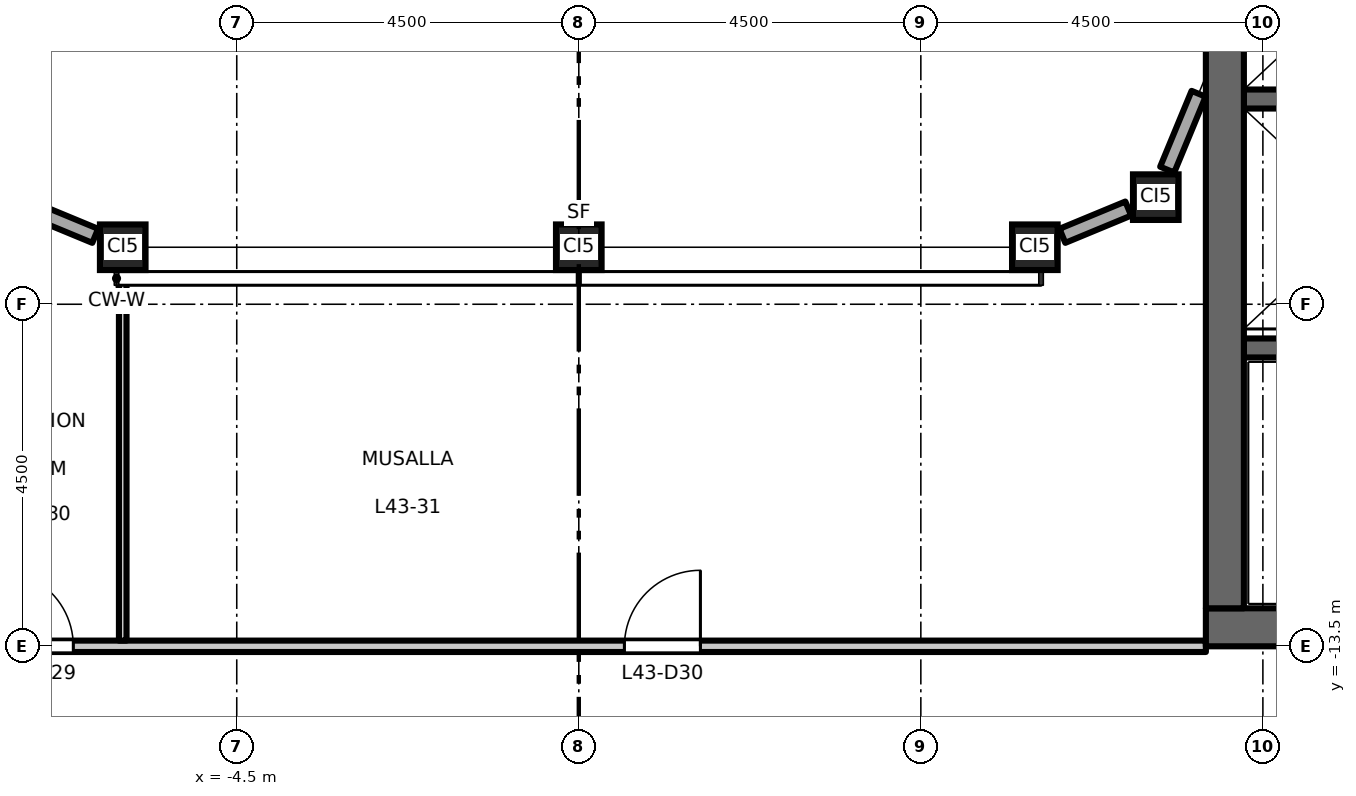
"""IFC4 building model, lengths in metres.
Left out: names, types, materials, properties, quantities, classifications, styles, units other than length and angle.
Written with IfcOpenShell. Run it as: python <this file> out.ifc"""

import sys

from ifc_helpers import new_model, si_unit, direction, frame, frame_2d, origin, origin_2d, place, context, subcontext, project, spatial, rectangle, hollow_rectangle, extrude, element, fill, save


model = new_model("IFC4")
c1 = context("Model", 3, precision=1e-05, world=origin(), true_north=direction((0.0, 1.0)))
c2 = subcontext(c1, "Body", "Model", "MODEL_VIEW")
j1 = project(units=[si_unit("LENGTHUNIT", "METRE"), si_unit("PLANEANGLEUNIT", "RADIAN")], contexts=[c1])
p1 = place(None, origin())
s1 = spatial("IfcSite", under=j1, at=p1, CompositionType="ELEMENT")
p2 = place(p1, origin())
s2 = spatial("IfcBuilding", under=s1, at=p2, CompositionType="ELEMENT")
p3 = place(p2, frame((0.0, 0.0, 201.7)))
s3 = spatial("IfcBuildingStorey", under=s2, at=p3, CompositionType="ELEMENT", Elevation=201.7)
for number, where, z_axis, x_axis in (
    (1, (-6.0, -8.25, 0.0), (0.0, 0.0, 1.0), (1.0, 0.0, 0.0)),
    (2, (0.0, -8.25, 0.0), (0.0, 0.0, 1.0), (1.0, 0.0, 0.0)),
    (3, (6.0, -8.25, 0.0), (0.0, 0.0, 1.0), (1.0, 0.0, 0.0)),
    (4, (7.591, -7.591, 0.0), (0.0, 0.0, 1.0), (1.0, 0.0, 0.0)),
):
    element("IfcColumn", number, at=place(p3, frame(where, z_axis=z_axis, x_axis=x_axis)), inside=s3, PredefinedType="COLUMN", context=c2, shape_type="SweptSolid", body=[
        extrude(hollow_rectangle(XDim=0.6, YDim=0.6, WallThickness=0.032, at=origin_2d()), origin(), (0.0, 0.0, 1.0), 4.5),
    ])
p4 = place(p3, frame((8.75, -6.3, 0.0), z_axis=(0.0, 0.0, 1.0), x_axis=(1.0, 0.0, 0.0)))
e5 = element("IfcWall", 5, at=p4, inside=s3, PredefinedType="SHEAR", context=c2, shape_type="SweptSolid", body=[
    extrude(rectangle(XDim=3.1, YDim=0.25, at=frame_2d((1.55, 0.0))), origin(), (0.0, 0.0, 1.0), 4.35),
])
p5 = place(p3, frame((8.75, -9.575, 0.0), z_axis=(0.0, 0.0, 1.0), x_axis=(1.0, 0.0, 0.0)))
e6 = element("IfcWall", 6, at=p5, inside=s3, PredefinedType="SHEAR", context=c2, shape_type="SweptSolid", body=[
    extrude(rectangle(XDim=8.0, YDim=0.25, at=frame_2d((4.0, 0.0))), origin(), (0.0, 0.0, 1.0), 4.35),
])
p6 = place(p5, frame((6.65, 0.0, 0.0)))
e7 = element("IfcOpeningElement", 7, at=p6, cuts=e6, PredefinedType="OPENING", context=c2, shape_type="SweptSolid", body=[
    extrude(rectangle(XDim=1.1, YDim=2.1, at=frame_2d((0.55, 1.05))), frame((0.0, 0.135, 0.0), z_axis=(0.0, -1.0, 0.0), x_axis=(1.0, 0.0, 0.0)), (0.0, 0.0, 1.0), 0.27),
])
p7 = place(p3, frame((8.25, -13.25, 0.0), z_axis=(0.0, 0.0, 1.0), x_axis=(1.0, 0.0, 0.0)))
e8 = element("IfcWall", 8, at=p7, inside=s3, PredefinedType="SHEAR", context=c2, shape_type="SweptSolid", body=[
    extrude(rectangle(XDim=13.5, YDim=0.5, at=frame_2d((6.75, 0.0))), origin(), (0.0, 0.0, 1.0), 4.35),
])
p8 = place(p3, frame((8.5, -13.0, 0.0), z_axis=(0.0, 0.0, 1.0), x_axis=(0.0, 1.0, 0.0)))
e9 = element("IfcWall", 9, at=p8, inside=s3, PredefinedType="SHEAR", context=c2, shape_type="SweptSolid", body=[
    extrude(rectangle(XDim=26.0, YDim=0.5, at=frame_2d((13.0, 0.0))), origin(), (0.0, 0.0, 1.0), 4.35),
])
p9 = place(p3, frame((6.362, -8.1, 0.0), z_axis=(0.0, 0.0, 1.0), x_axis=(0.923829670615, 0.382803787458, 0.0)))
e10 = element("IfcWall", 10, at=p9, inside=s3, PredefinedType="STANDARD", context=c2, shape_type="SweptSolid", body=[
    extrude(rectangle(XDim=0.938, YDim=0.2, at=frame_2d((0.469, 0.0))), origin(), (0.0, 0.0, 1.0), 3.918),
])
p10 = place(p3, frame((7.741, -7.229, 0.0), z_axis=(0.0, 0.0, 1.0), x_axis=(0.382704496366, 0.923870807235, 0.0)))
e11 = element("IfcWall", 11, at=p10, inside=s3, PredefinedType="STANDARD", context=c2, shape_type="SweptSolid", body=[
    extrude(rectangle(XDim=1.08, YDim=0.2, at=frame_2d((0.54, 0.0))), origin(), (0.0, 0.0, 1.0), 3.918),
])
p11 = place(p3, frame((-7.229, -7.741, 0.0), z_axis=(0.0, 0.0, 1.0), x_axis=(0.923829670615, -0.382803787458, 0.0)))
e12 = element("IfcWall", 12, at=p11, inside=s3, PredefinedType="STANDARD", context=c2, shape_type="SweptSolid", body=[
    extrude(rectangle(XDim=0.938, YDim=0.2, at=frame_2d((0.469, 0.0))), origin(), (0.0, 0.0, 1.0), 3.918),
])
p12 = place(p3, frame((-8.25, -13.5, 0.0), z_axis=(0.0, 0.0, 1.0), x_axis=(1.0, 0.0, 0.0)))
e13 = element("IfcWall", 13, at=p12, inside=s3, PredefinedType="PARTITIONING", context=c2, shape_type="SweptSolid", body=[
    extrude(rectangle(XDim=16.5, YDim=0.15, at=frame_2d((8.25, 0.0))), origin(), (0.0, 0.0, 1.0), 3.95),
])
p13 = place(p12, frame((0.6, 0.0, 0.0)))
e14 = element("IfcOpeningElement", 14, at=p13, cuts=e13, PredefinedType="OPENING", context=c2, shape_type="SweptSolid", body=[
    extrude(rectangle(XDim=1.0, YDim=2.1, at=frame_2d((0.5, 1.05))), frame((0.0, 0.085, 0.0), z_axis=(0.0, -1.0, 0.0), x_axis=(1.0, 0.0, 0.0)), (0.0, 0.0, 1.0), 0.17),
])
p14 = place(p12, frame((8.85, 0.0, 0.0)))
e15 = element("IfcOpeningElement", 15, at=p14, cuts=e13, PredefinedType="OPENING", context=c2, shape_type="SweptSolid", body=[
    extrude(rectangle(XDim=1.0, YDim=2.1, at=frame_2d((0.5, 1.05))), frame((0.0, 0.085, 0.0), z_axis=(0.0, -1.0, 0.0), x_axis=(1.0, 0.0, 0.0)), (0.0, 0.0, 1.0), 0.17),
])
p15 = place(p3, frame((-6.0, -13.425, 0.0), z_axis=(0.0, 0.0, 1.0), x_axis=(0.0, 1.0, 0.0)))
e16 = element("IfcWall", 16, at=p15, inside=s3, PredefinedType="PARTITIONING", context=c2, shape_type="SweptSolid", body=[
    extrude(rectangle(XDim=4.825, YDim=0.1, at=frame_2d((2.413, 0.0))), origin(), (0.0, 0.0, 1.0), 4.35),
])
p16 = place(p13, origin())
e17 = element("IfcDoor", 17, at=p16, inside=s3, OperationType="SINGLE_SWING_LEFT", PredefinedType="DOOR", context=c2, shape_type="SweptSolid", body=[
    extrude(rectangle(XDim=1.0, YDim=2.1, at=frame_2d((0.5, 1.05))), frame((0.0, 0.025, 0.0), z_axis=(0.0, -1.0, 0.0), x_axis=(1.0, 0.0, 0.0)), (0.0, 0.0, 1.0), 0.05),
])
fill(e14, e17)
p17 = place(p14, origin())
e18 = element("IfcDoor", 18, at=p17, inside=s3, OperationType="SINGLE_SWING_RIGHT", PredefinedType="DOOR", context=c2, shape_type="SweptSolid", body=[
    extrude(rectangle(XDim=1.0, YDim=2.1, at=frame_2d((0.5, 1.05))), frame((0.0, 0.025, 0.0), z_axis=(0.0, -1.0, 0.0), x_axis=(1.0, 0.0, 0.0)), (0.0, 0.0, 1.0), 0.05),
])
fill(e15, e18)
save(model, sys.argv[1])
